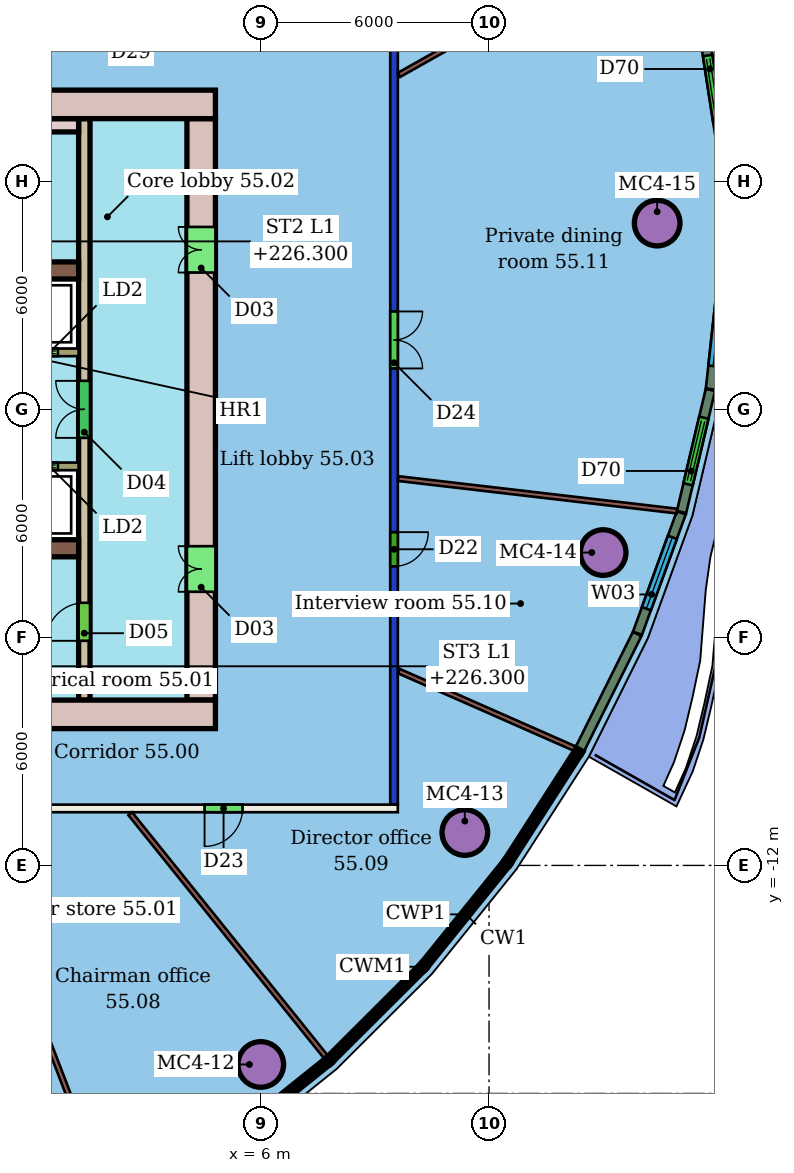
"""IFC4 building model, lengths in metres.
Left out: names, types, materials, properties, quantities, classifications, styles, units other than length and angle.
Written with IfcOpenShell. Run it as: python <this file> out.ifc"""

import sys

from ifc_helpers import new_model, si_unit, direction, frame, frame_2d, origin, origin_2d, place, context, subcontext, project, spatial, rectangle, hollow_circle, extrude, element, fill, save


model = new_model("IFC4")
c1 = context("Model", 3, precision=1e-05, world=origin(), true_north=direction((0.0, 1.0)))
c2 = subcontext(c1, "Body", "Model", "MODEL_VIEW")
j1 = project(units=[si_unit("LENGTHUNIT", "METRE"), si_unit("PLANEANGLEUNIT", "RADIAN")], contexts=[c1])
p1 = place(None, origin())
s1 = spatial("IfcSite", under=j1, at=p1, CompositionType="ELEMENT")
p2 = place(p1, origin())
s2 = spatial("IfcBuilding", under=s1, at=p2, CompositionType="ELEMENT")
p3 = place(p2, frame((0.0, 0.0, 224.5)))
s3 = spatial("IfcBuildingStorey", under=s2, at=p3, CompositionType="ELEMENT", Elevation=224.5)
for number, where, z_axis, x_axis in (
    (1, (5.993, -17.237, 0.0), (0.0, 0.0, 1.0), (1.0, 0.0, 0.0)),
    (2, (11.363, -11.134, 0.0), (0.0, 0.0, 1.0), (1.0, 0.0, 0.0)),
    (3, (15.003, -3.768, 0.0), (0.0, 0.0, 1.0), (1.0, 0.0, 0.0)),
    (4, (16.424, 4.901, 0.0), (0.0, 0.0, 1.0), (1.0, 0.0, 0.0)),
):
    element("IfcColumn", number, at=place(p3, frame(where, z_axis=z_axis, x_axis=x_axis)), inside=s3, PredefinedType="COLUMN", context=c2, shape_type="SweptSolid", body=[
        extrude(hollow_circle(Radius=0.6, WallThickness=0.045, at=origin_2d()), origin(), (0.0, 0.0, 1.0), 3.45),
    ])
p4 = place(p3, frame((9.6, -10.5, 0.0), z_axis=(0.0, 0.0, 1.0), x_axis=(-1.0, 0.0, 0.0)))
e5 = element("IfcWall", 5, at=p4, inside=s3, PredefinedType="PARTITIONING", context=c2, shape_type="SweptSolid", body=[
    extrude(rectangle(XDim=31.2, YDim=0.2, at=frame_2d((15.6, 0.0))), origin(), (0.0, 0.0, 1.0), 3.45),
])
p5 = place(p4, frame((18.197, 0.0, 0.0)))
e6 = element("IfcOpeningElement", 6, at=p5, cuts=e5, PredefinedType="OPENING", context=c2, shape_type="SweptSolid", body=[
    extrude(rectangle(XDim=1.8, YDim=2.1, at=frame_2d((0.9, 1.05))), frame((0.0, 0.11, 0.0), z_axis=(0.0, -1.0, 0.0), x_axis=(1.0, 0.0, 0.0)), (0.0, 0.0, 1.0), 0.22),
])
p6 = place(p4, frame((12.291, 0.0, 0.0)))
e7 = element("IfcOpeningElement", 7, at=p6, cuts=e5, PredefinedType="OPENING", context=c2, shape_type="SweptSolid", body=[
    extrude(rectangle(XDim=1.2, YDim=2.4, at=frame_2d((0.6, 1.2))), frame((0.0, 0.11, 0.0), z_axis=(0.0, -1.0, 0.0), x_axis=(1.0, 0.0, 0.0)), (0.0, 0.0, 1.0), 0.22),
])
p7 = place(p4, frame((9.324, 0.0, 0.0)))
e8 = element("IfcOpeningElement", 8, at=p7, cuts=e5, PredefinedType="OPENING", context=c2, shape_type="SweptSolid", body=[
    extrude(rectangle(XDim=1.0, YDim=2.4, at=frame_2d((0.5, 1.2))), frame((0.0, 0.11, 0.0), z_axis=(0.0, -1.0, 0.0), x_axis=(1.0, 0.0, 0.0)), (0.0, 0.0, 1.0), 0.22),
])
p8 = place(p4, frame((4.086, 0.0, 0.0)))
e9 = element("IfcOpeningElement", 9, at=p8, cuts=e5, PredefinedType="OPENING", context=c2, shape_type="SweptSolid", body=[
    extrude(rectangle(XDim=1.0, YDim=2.4, at=frame_2d((0.5, 1.2))), frame((0.0, 0.11, 0.0), z_axis=(0.0, -1.0, 0.0), x_axis=(1.0, 0.0, 0.0)), (0.0, 0.0, 1.0), 0.22),
])
p9 = place(p3, frame((9.5, 10.4, 0.0), z_axis=(0.0, 0.0, 1.0), x_axis=(0.0, -1.0, 0.0)))
e10 = element("IfcWall", 10, at=p9, inside=s3, PredefinedType="PARTITIONING", context=c2, shape_type="SweptSolid", body=[
    extrude(rectangle(XDim=20.8, YDim=0.2, at=frame_2d((10.4, 0.0))), origin(), (0.0, 0.0, 1.0), 3.05),
])
p10 = place(p9, frame((13.631, 0.0, 0.0)))
e11 = element("IfcOpeningElement", 11, at=p10, cuts=e10, PredefinedType="OPENING", context=c2, shape_type="SweptSolid", body=[
    extrude(rectangle(XDim=0.9, YDim=2.1, at=frame_2d((0.45, 1.05))), frame((0.0, 0.11, 0.0), z_axis=(0.0, -1.0, 0.0), x_axis=(1.0, 0.0, 0.0)), (0.0, 0.0, 1.0), 0.22),
])
p11 = place(p9, frame((7.823, 0.0, 0.0)))
e12 = element("IfcOpeningElement", 12, at=p11, cuts=e10, PredefinedType="OPENING", context=c2, shape_type="SweptSolid", body=[
    extrude(rectangle(XDim=1.5, YDim=2.1, at=frame_2d((0.75, 1.05))), frame((0.0, 0.11, 0.0), z_axis=(0.0, -1.0, 0.0), x_axis=(1.0, 0.0, 0.0)), (0.0, 0.0, 1.0), 0.22),
])
p12 = place(p3, frame((2.097, -21.057, 0.0), z_axis=(0.0, 0.0, 1.0), x_axis=(-0.35890151598, 0.933375434553, 0.0)))
e13 = element("IfcWall", 13, at=p12, inside=s3, PredefinedType="PARTITIONING", context=c2, shape_type="SweptSolid", body=[
    extrude(rectangle(XDim=11.179, YDim=0.125, at=frame_2d((5.59, 0.0))), origin(), (0.0, 0.0, 1.0), 3.45),
])
p13 = place(p3, frame((7.706, -17.038, 0.0), z_axis=(0.0, 0.0, 1.0), x_axis=(-0.626795529624, 0.77918378066, 0.0)))
e14 = element("IfcWall", 14, at=p13, inside=s3, PredefinedType="PARTITIONING", context=c2, shape_type="SweptSolid", body=[
    extrude(rectangle(XDim=8.212, YDim=0.125, at=frame_2d((4.106, 0.0))), origin(), (0.0, 0.0, 1.0), 3.45),
])
p14 = place(p3, frame((14.257, -8.927, 0.0), z_axis=(0.0, 0.0, 1.0), x_axis=(-0.915078040673, 0.403276802555, 0.0)))
e15 = element("IfcWall", 15, at=p14, inside=s3, PredefinedType="PARTITIONING", context=c2, shape_type="SweptSolid", body=[
    extrude(rectangle(XDim=5.062, YDim=0.125, at=frame_2d((2.531, 0.0))), origin(), (0.0, 0.0, 1.0), 3.45),
])
p15 = place(p3, frame((16.943, -2.676, 0.0), z_axis=(0.0, 0.0, 1.0), x_axis=(-0.993265421739, 0.115861132295, 0.0)))
e16 = element("IfcWall", 16, at=p15, inside=s3, PredefinedType="PARTITIONING", context=c2, shape_type="SweptSolid", body=[
    extrude(rectangle(XDim=7.386, YDim=0.125, at=frame_2d((3.693, 0.0))), origin(), (0.0, 0.0, 1.0), 3.45),
])
p16 = place(p3, frame((16.664, 12.761, 0.0), z_axis=(0.0, 0.0, 1.0), x_axis=(-0.871369479299, -0.490627384627, 0.0)))
e17 = element("IfcWall", 17, at=p16, inside=s3, PredefinedType="PARTITIONING", context=c2, shape_type="SweptSolid", body=[
    extrude(rectangle(XDim=8.072, YDim=0.125, at=frame_2d((4.036, 0.0))), origin(), (0.0, 0.0, 1.0), 3.45),
])
p17 = place(p3, frame((14.39, -8.94, 0.0), z_axis=(0.0, 0.0, 1.0), x_axis=(0.445538884837, 0.895262588349, 0.0)))
e18 = element("IfcWall", 18, at=p17, inside=s3, PredefinedType="SOLIDWALL", context=c2, shape_type="SweptSolid", body=[
    extrude(rectangle(XDim=3.384, YDim=0.25, at=frame_2d((1.692, 0.0))), origin(), (0.0, 0.0, 1.0), 3.1),
])
p18 = place(p3, frame((15.906, -5.89, 0.0), z_axis=(0.0, 0.0, 1.0), x_axis=(0.341964011847, 0.939713049075, 0.0)))
e19 = element("IfcWall", 19, at=p18, inside=s3, PredefinedType="SOLIDWALL", context=c2, shape_type="SweptSolid", body=[
    extrude(rectangle(XDim=3.371, YDim=0.25, at=frame_2d((1.686, 0.0))), origin(), (0.0, 0.0, 1.0), 3.1),
])
p19 = place(p18, frame((0.686, 0.0, 0.9)))
e20 = element("IfcOpeningElement", 20, at=p19, cuts=e19, PredefinedType="OPENING", context=c2, shape_type="SweptSolid", body=[
    extrude(rectangle(XDim=2.0, YDim=2.1, at=frame_2d((1.0, 1.05))), frame((0.0, 0.135, 0.0), z_axis=(0.0, -1.0, 0.0), x_axis=(1.0, 0.0, 0.0)), (0.0, 0.0, 1.0), 0.27),
])
p20 = place(p3, frame((17.066, -2.701, 0.0), z_axis=(0.0, 0.0, 1.0), x_axis=(0.229983418088, 0.973194547562, 0.0)))
e21 = element("IfcWall", 21, at=p20, inside=s3, PredefinedType="SOLIDWALL", context=c2, shape_type="SweptSolid", body=[
    extrude(rectangle(XDim=3.3, YDim=0.25, at=frame_2d((1.65, 0.0))), origin(), (0.0, 0.0, 1.0), 3.1),
])
p21 = place(p20, frame((0.75, 0.0, 0.0)))
e22 = element("IfcOpeningElement", 22, at=p21, cuts=e21, PredefinedType="OPENING", context=c2, shape_type="SweptSolid", body=[
    extrude(rectangle(XDim=1.8, YDim=2.4, at=frame_2d((0.9, 1.2))), frame((0.0, 0.135, 0.0), z_axis=(0.0, -1.0, 0.0), x_axis=(1.0, 0.0, 0.0)), (0.0, 0.0, 1.0), 0.27),
])
p22 = place(p3, frame((17.829, 0.534, 0.0), z_axis=(0.0, 0.0, 1.0), x_axis=(0.10972407218, 0.993962085788, 0.0)))
e23 = element("IfcWall", 23, at=p22, inside=s3, PredefinedType="SOLIDWALL", context=c2, shape_type="SweptSolid", body=[
    extrude(rectangle(XDim=3.22, YDim=0.25, at=frame_2d((1.61, 0.0))), origin(), (0.0, 0.0, 1.0), 3.1),
])
p23 = place(p22, frame((0.61, 0.0, 0.9)))
e24 = element("IfcOpeningElement", 24, at=p23, cuts=e23, PredefinedType="OPENING", context=c2, shape_type="SweptSolid", body=[
    extrude(rectangle(XDim=2.0, YDim=2.1, at=frame_2d((1.0, 1.05))), frame((0.0, 0.135, 0.0), z_axis=(0.0, -1.0, 0.0), x_axis=(1.0, 0.0, 0.0)), (0.0, 0.0, 1.0), 0.27),
])
p24 = place(p3, frame((18.123, 6.916, 0.0), z_axis=(0.0, 0.0, 1.0), x_axis=(-0.15305011878, 0.98821842785, 0.0)))
e25 = element("IfcWall", 25, at=p24, inside=s3, PredefinedType="SOLIDWALL", context=c2, shape_type="SweptSolid", body=[
    extrude(rectangle(XDim=3.048, YDim=0.25, at=frame_2d((1.524, 0.0))), origin(), (0.0, 0.0, 1.0), 3.1),
])
p25 = place(p24, frame((0.624, 0.0, 0.0)))
e26 = element("IfcOpeningElement", 26, at=p25, cuts=e25, PredefinedType="OPENING", context=c2, shape_type="SweptSolid", body=[
    extrude(rectangle(XDim=1.8, YDim=2.4, at=frame_2d((0.9, 1.2))), frame((0.0, 0.135, 0.0), z_axis=(0.0, -1.0, 0.0), x_axis=(1.0, 0.0, 0.0)), (0.0, 0.0, 1.0), 0.27),
])
p26 = place(p3, frame((4.8, 8.025, 0.0), z_axis=(0.0, 0.0, 1.0), x_axis=(-1.0, 0.0, 0.0)))
e27 = element("IfcWall", 27, at=p26, inside=s3, PredefinedType="SHEAR", context=c2, shape_type="SweptSolid", body=[
    extrude(rectangle(XDim=10.8, YDim=0.75, at=frame_2d((5.4, 0.0))), origin(), (0.0, 0.0, 1.0), 3.3),
])
p27 = place(p26, frame((4.4, 0.0, 0.0)))
e28 = element("IfcOpeningElement", 28, at=p27, cuts=e27, PredefinedType="OPENING", context=c2, shape_type="SweptSolid", body=[
    extrude(rectangle(XDim=1.2, YDim=2.1, at=frame_2d((0.6, 1.05))), frame((0.0, 0.385, 0.0), z_axis=(0.0, -1.0, 0.0), x_axis=(1.0, 0.0, 0.0)), (0.0, 0.0, 1.0), 0.77),
])
p28 = place(p3, frame((-16.8, -8.025, 0.0), z_axis=(0.0, 0.0, 1.0), x_axis=(1.0, 0.0, 0.0)))
e29 = element("IfcWall", 29, at=p28, inside=s3, PredefinedType="SHEAR", context=c2, shape_type="SweptSolid", body=[
    extrude(rectangle(XDim=21.6, YDim=0.75, at=frame_2d((10.8, 0.0))), origin(), (0.0, 0.0, 1.0), 3.3),
])
p29 = place(p28, frame((4.8, 0.0, 0.0)))
e30 = element("IfcOpeningElement", 30, at=p29, cuts=e29, PredefinedType="OPENING", context=c2, shape_type="SweptSolid", body=[
    extrude(rectangle(XDim=1.2, YDim=2.1, at=frame_2d((0.6, 1.05))), frame((0.0, 0.385, 0.0), z_axis=(0.0, -1.0, 0.0), x_axis=(1.0, 0.0, 0.0)), (0.0, 0.0, 1.0), 0.77),
])
p30 = place(p3, frame((4.425, -7.65, 0.0), z_axis=(0.0, 0.0, 1.0), x_axis=(0.0, 1.0, 0.0)))
e31 = element("IfcWall", 31, at=p30, inside=s3, PredefinedType="SHEAR", context=c2, shape_type="SweptSolid", body=[
    extrude(rectangle(XDim=15.3, YDim=0.75, at=frame_2d((7.65, 0.0))), origin(), (0.0, 0.0, 1.0), 3.3),
])
p31 = place(p30, frame((2.85, 0.0, 0.0)))
e32 = element("IfcOpeningElement", 32, at=p31, cuts=e31, PredefinedType="OPENING", context=c2, shape_type="SweptSolid", body=[
    extrude(rectangle(XDim=1.2, YDim=2.1, at=frame_2d((0.6, 1.05))), frame((0.0, 0.385, 0.0), z_axis=(0.0, -1.0, 0.0), x_axis=(1.0, 0.0, 0.0)), (0.0, 0.0, 1.0), 0.77),
])
p32 = place(p30, frame((11.25, 0.0, 0.0)))
e33 = element("IfcOpeningElement", 33, at=p32, cuts=e31, PredefinedType="OPENING", context=c2, shape_type="SweptSolid", body=[
    extrude(rectangle(XDim=1.2, YDim=2.1, at=frame_2d((0.6, 1.05))), frame((0.0, 0.385, 0.0), z_axis=(0.0, -1.0, 0.0), x_axis=(1.0, 0.0, 0.0)), (0.0, 0.0, 1.0), 0.77),
])
for number, where, z_axis, x_axis in (
    (34, (-6.0, 3.655, 0.0), (0.0, 0.0, 1.0), (1.0, 0.0, 0.0)),
    (35, (-6.0, -3.655, 0.0), (0.0, 0.0, 1.0), (1.0, 0.0, 0.0)),
):
    element("IfcWall", number, at=place(p3, frame(where, z_axis=z_axis, x_axis=x_axis)), inside=s3, PredefinedType="SHEAR", context=c2, shape_type="SweptSolid", body=[
        extrude(rectangle(XDim=7.2, YDim=0.45, at=frame_2d((3.6, 0.0))), origin(), (0.0, 0.0, 1.0), 3.3),
    ])
p33 = place(p3, frame((1.35, -7.65, 0.0), z_axis=(0.0, 0.0, 1.0), x_axis=(0.0, 1.0, 0.0)))
e36 = element("IfcWall", 36, at=p33, inside=s3, PredefinedType="SHEAR", context=c2, shape_type="SweptSolid", body=[
    extrude(rectangle(XDim=15.3, YDim=0.3, at=frame_2d((7.65, 0.0))), origin(), (0.0, 0.0, 1.0), 3.3),
])
p34 = place(p33, frame((1.56, 0.0, 0.0)))
e37 = element("IfcOpeningElement", 37, at=p34, cuts=e36, PredefinedType="OPENING", context=c2, shape_type="SweptSolid", body=[
    extrude(rectangle(XDim=1.0, YDim=2.1, at=frame_2d((0.5, 1.05))), frame((0.0, 0.16, 0.0), z_axis=(0.0, -1.0, 0.0), x_axis=(1.0, 0.0, 0.0)), (0.0, 0.0, 1.0), 0.32),
])
p35 = place(p33, frame((6.9, 0.0, 0.0)))
e38 = element("IfcOpeningElement", 38, at=p35, cuts=e36, PredefinedType="OPENING", context=c2, shape_type="SweptSolid", body=[
    extrude(rectangle(XDim=1.5, YDim=2.1, at=frame_2d((0.75, 1.05))), frame((0.0, 0.16, 0.0), z_axis=(0.0, -1.0, 0.0), x_axis=(1.0, 0.0, 0.0)), (0.0, 0.0, 1.0), 0.32),
])
p36 = place(p3, frame((-13.2, 1.5, 0.0), z_axis=(0.0, 0.0, 1.0), x_axis=(1.0, 0.0, 0.0)))
e39 = element("IfcWall", 39, at=p36, inside=s3, PredefinedType="SHEAR", context=c2, shape_type="SweptSolid", body=[
    extrude(rectangle(XDim=14.4, YDim=0.2, at=frame_2d((7.2, 0.0))), origin(), (0.0, 0.0, 1.0), 3.3),
])
p37 = place(p36, frame((10.312, 0.0, 0.0)))
e40 = element("IfcOpeningElement", 40, at=p37, cuts=e39, PredefinedType="OPENING", context=c2, shape_type="SweptSolid", body=[
    extrude(rectangle(XDim=1.1, YDim=2.1, at=frame_2d((0.55, 1.05))), frame((0.0, 0.11, 0.0), z_axis=(0.0, -1.0, 0.0), x_axis=(1.0, 0.0, 0.0)), (0.0, 0.0, 1.0), 0.22),
])
p38 = place(p36, frame((12.754, 0.0, 0.0)))
e41 = element("IfcOpeningElement", 41, at=p38, cuts=e39, PredefinedType="OPENING", context=c2, shape_type="SweptSolid", body=[
    extrude(rectangle(XDim=1.1, YDim=2.1, at=frame_2d((0.55, 1.05))), frame((0.0, 0.11, 0.0), z_axis=(0.0, -1.0, 0.0), x_axis=(1.0, 0.0, 0.0)), (0.0, 0.0, 1.0), 0.22),
])
p39 = place(p36, frame((0.15, 0.0, 0.0)))
e42 = element("IfcOpeningElement", 42, at=p39, cuts=e39, PredefinedType="OPENING", context=c2, shape_type="SweptSolid", body=[
    extrude(rectangle(XDim=0.9, YDim=2.1, at=frame_2d((0.45, 1.05))), frame((0.0, 0.11, 0.0), z_axis=(0.0, -1.0, 0.0), x_axis=(1.0, 0.0, 0.0)), (0.0, 0.0, 1.0), 0.22),
])
p40 = place(p36, frame((4.222, 0.0, 0.0)))
e43 = element("IfcOpeningElement", 43, at=p40, cuts=e39, PredefinedType="OPENING", context=c2, shape_type="SweptSolid", body=[
    extrude(rectangle(XDim=0.9, YDim=2.1, at=frame_2d((0.45, 1.05))), frame((0.0, 0.11, 0.0), z_axis=(0.0, -1.0, 0.0), x_axis=(1.0, 0.0, 0.0)), (0.0, 0.0, 1.0), 0.22),
])
p41 = place(p36, frame((8.367, 0.0, 0.0)))
e44 = element("IfcOpeningElement", 44, at=p41, cuts=e39, PredefinedType="OPENING", context=c2, shape_type="SweptSolid", body=[
    extrude(rectangle(XDim=1.0, YDim=2.1, at=frame_2d((0.5, 1.05))), frame((0.0, 0.11, 0.0), z_axis=(0.0, -1.0, 0.0), x_axis=(1.0, 0.0, 0.0)), (0.0, 0.0, 1.0), 0.22),
])
p42 = place(p3, frame((1.2, -1.5, 0.0), z_axis=(0.0, 0.0, 1.0), x_axis=(-1.0, 0.0, 0.0)))
e45 = element("IfcWall", 45, at=p42, inside=s3, PredefinedType="SHEAR", context=c2, shape_type="SweptSolid", body=[
    extrude(rectangle(XDim=14.4, YDim=0.2, at=frame_2d((7.2, 0.0))), origin(), (0.0, 0.0, 1.0), 3.3),
])
p43 = place(p42, frame((7.821, 0.0, 0.0)))
e46 = element("IfcOpeningElement", 46, at=p43, cuts=e45, PredefinedType="OPENING", context=c2, shape_type="SweptSolid", body=[
    extrude(rectangle(XDim=1.2, YDim=2.1, at=frame_2d((0.6, 1.05))), frame((0.0, 0.11, 0.0), z_axis=(0.0, -1.0, 0.0), x_axis=(1.0, 0.0, 0.0)), (0.0, 0.0, 1.0), 0.22),
])
p44 = place(p42, frame((0.546, 0.0, 0.0)))
e47 = element("IfcOpeningElement", 47, at=p44, cuts=e45, PredefinedType="OPENING", context=c2, shape_type="SweptSolid", body=[
    extrude(rectangle(XDim=1.1, YDim=2.1, at=frame_2d((0.55, 1.05))), frame((0.0, 0.11, 0.0), z_axis=(0.0, -1.0, 0.0), x_axis=(1.0, 0.0, 0.0)), (0.0, 0.0, 1.0), 0.22),
])
p45 = place(p42, frame((5.632, 0.0, 0.0)))
e48 = element("IfcOpeningElement", 48, at=p45, cuts=e45, PredefinedType="OPENING", context=c2, shape_type="SweptSolid", body=[
    extrude(rectangle(XDim=1.0, YDim=2.1, at=frame_2d((0.5, 1.05))), frame((0.0, 0.11, 0.0), z_axis=(0.0, -1.0, 0.0), x_axis=(1.0, 0.0, 0.0)), (0.0, 0.0, 1.0), 0.22),
])
p46 = place(p42, frame((2.592, 0.0, 0.0)))
e49 = element("IfcOpeningElement", 49, at=p46, cuts=e45, PredefinedType="OPENING", context=c2, shape_type="SweptSolid", body=[
    extrude(rectangle(XDim=1.0, YDim=2.1, at=frame_2d((0.5, 1.05))), frame((0.0, 0.11, 0.0), z_axis=(0.0, -1.0, 0.0), x_axis=(1.0, 0.0, 0.0)), (0.0, 0.0, 1.0), 0.22),
])
p47 = place(p3, frame((0.4, 7.475, 0.0), z_axis=(0.0, 0.0, 1.0), x_axis=(1.0, 0.0, 0.0)))
e50 = element("IfcWall", 50, at=p47, inside=s3, PredefinedType="SHEAR", context=c2, shape_type="SweptSolid", body=[
    extrude(rectangle(XDim=0.8, YDim=0.35, at=frame_2d((0.4, 0.0))), origin(), (0.0, 0.0, 1.0), 3.3),
])
p48 = place(p8, origin())
e51 = element("IfcDoor", 51, at=p48, inside=s3, OperationType="SINGLE_SWING_RIGHT", PredefinedType="DOOR", context=c2, shape_type="SweptSolid", body=[
    extrude(rectangle(XDim=1.0, YDim=2.4, at=frame_2d((0.5, 1.2))), frame((0.0, 0.025, 0.0), z_axis=(0.0, -1.0, 0.0), x_axis=(1.0, 0.0, 0.0)), (0.0, 0.0, 1.0), 0.05),
])
fill(e9, e51)
p49 = place(p10, origin())
e52 = element("IfcDoor", 52, at=p49, inside=s3, OperationType="SINGLE_SWING_LEFT", PredefinedType="DOOR", context=c2, shape_type="SweptSolid", body=[
    extrude(rectangle(XDim=0.9, YDim=2.1, at=frame_2d((0.45, 1.05))), frame((0.0, 0.025, 0.0), z_axis=(0.0, -1.0, 0.0), x_axis=(1.0, 0.0, 0.0)), (0.0, 0.0, 1.0), 0.05),
])
fill(e11, e52)
p50 = place(p11, origin())
e53 = element("IfcDoor", 53, at=p50, inside=s3, OperationType="DOUBLE_DOOR_SINGLE_SWING", PredefinedType="DOOR", context=c2, shape_type="SweptSolid", body=[
    extrude(rectangle(XDim=1.5, YDim=2.1, at=frame_2d((0.75, 1.05))), frame((0.0, 0.025, 0.0), z_axis=(0.0, -1.0, 0.0), x_axis=(1.0, 0.0, 0.0)), (0.0, 0.0, 1.0), 0.05),
])
fill(e12, e53)
p51 = place(p19, origin())
e54 = element("IfcWindow", 54, at=p51, inside=s3, PartitioningType="SINGLE_PANEL", PredefinedType="WINDOW", context=c2, shape_type="SweptSolid", body=[
    extrude(rectangle(XDim=2.0, YDim=2.1, at=frame_2d((1.0, 1.05))), frame((0.0, 0.03, 0.0), z_axis=(0.0, -1.0, 0.0), x_axis=(1.0, 0.0, 0.0)), (0.0, 0.0, 1.0), 0.06),
])
fill(e20, e54)
p52 = place(p21, origin())
e55 = element("IfcDoor", 55, at=p52, inside=s3, OperationType="DOUBLE_DOOR_SLIDING", PredefinedType="DOOR", context=c2, shape_type="SweptSolid", body=[
    extrude(rectangle(XDim=1.8, YDim=2.4, at=frame_2d((0.9, 1.2))), frame((0.0, 0.025, 0.0), z_axis=(0.0, -1.0, 0.0), x_axis=(1.0, 0.0, 0.0)), (0.0, 0.0, 1.0), 0.05),
])
fill(e22, e55)
p53 = place(p23, origin())
e56 = element("IfcWindow", 56, at=p53, inside=s3, PartitioningType="SINGLE_PANEL", PredefinedType="WINDOW", context=c2, shape_type="SweptSolid", body=[
    extrude(rectangle(XDim=2.0, YDim=2.1, at=frame_2d((1.0, 1.05))), frame((0.0, 0.03, 0.0), z_axis=(0.0, -1.0, 0.0), x_axis=(1.0, 0.0, 0.0)), (0.0, 0.0, 1.0), 0.06),
])
fill(e24, e56)
p54 = place(p25, origin())
e57 = element("IfcDoor", 57, at=p54, inside=s3, OperationType="DOUBLE_DOOR_SLIDING", PredefinedType="DOOR", context=c2, shape_type="SweptSolid", body=[
    extrude(rectangle(XDim=1.8, YDim=2.4, at=frame_2d((0.9, 1.2))), frame((0.0, 0.025, 0.0), z_axis=(0.0, -1.0, 0.0), x_axis=(1.0, 0.0, 0.0)), (0.0, 0.0, 1.0), 0.05),
])
fill(e26, e57)
p55 = place(p31, origin())
e58 = element("IfcDoor", 58, at=p55, inside=s3, OperationType="DOUBLE_DOOR_SINGLE_SWING", PredefinedType="NOTDEFINED", context=c2, shape_type="SweptSolid", body=[
    extrude(rectangle(XDim=1.2, YDim=2.1, at=frame_2d((0.6, 1.05))), frame((0.0, 0.025, 0.0), z_axis=(0.0, -1.0, 0.0), x_axis=(1.0, 0.0, 0.0)), (0.0, 0.0, 1.0), 0.05),
])
fill(e32, e58)
p56 = place(p32, origin())
e59 = element("IfcDoor", 59, at=p56, inside=s3, OperationType="DOUBLE_DOOR_SINGLE_SWING", PredefinedType="NOTDEFINED", context=c2, shape_type="SweptSolid", body=[
    extrude(rectangle(XDim=1.2, YDim=2.1, at=frame_2d((0.6, 1.05))), frame((0.0, 0.025, 0.0), z_axis=(0.0, -1.0, 0.0), x_axis=(1.0, 0.0, 0.0)), (0.0, 0.0, 1.0), 0.05),
])
fill(e33, e59)
p57 = place(p34, origin())
e60 = element("IfcDoor", 60, at=p57, inside=s3, OperationType="SINGLE_SWING_LEFT", PredefinedType="NOTDEFINED", context=c2, shape_type="SweptSolid", body=[
    extrude(rectangle(XDim=1.0, YDim=2.1, at=frame_2d((0.5, 1.05))), frame((0.0, 0.025, 0.0), z_axis=(0.0, -1.0, 0.0), x_axis=(1.0, 0.0, 0.0)), (0.0, 0.0, 1.0), 0.05),
])
fill(e37, e60)
p58 = place(p35, origin())
e61 = element("IfcDoor", 61, at=p58, inside=s3, OperationType="DOUBLE_DOOR_SINGLE_SWING", PredefinedType="NOTDEFINED", context=c2, shape_type="SweptSolid", body=[
    extrude(rectangle(XDim=1.5, YDim=2.1, at=frame_2d((0.75, 1.05))), frame((0.0, 0.025, 0.0), z_axis=(0.0, -1.0, 0.0), x_axis=(1.0, 0.0, 0.0)), (0.0, 0.0, 1.0), 0.05),
])
fill(e38, e61)
p59 = place(p38, origin())
e62 = element("IfcDoor", 62, at=p59, inside=s3, OperationType="DOUBLE_DOOR_SLIDING", PredefinedType="NOTDEFINED", context=c2, shape_type="SweptSolid", body=[
    extrude(rectangle(XDim=1.1, YDim=2.1, at=frame_2d((0.55, 1.05))), frame((0.0, 0.025, 0.0), z_axis=(0.0, -1.0, 0.0), x_axis=(1.0, 0.0, 0.0)), (0.0, 0.0, 1.0), 0.05),
])
fill(e41, e62)
p60 = place(p44, origin())
e63 = element("IfcDoor", 63, at=p60, inside=s3, OperationType="DOUBLE_DOOR_SLIDING", PredefinedType="NOTDEFINED", context=c2, shape_type="SweptSolid", body=[
    extrude(rectangle(XDim=1.1, YDim=2.1, at=frame_2d((0.55, 1.05))), frame((0.0, 0.025, 0.0), z_axis=(0.0, -1.0, 0.0), x_axis=(1.0, 0.0, 0.0)), (0.0, 0.0, 1.0), 0.05),
])
fill(e47, e63)
save(model, sys.argv[1])
